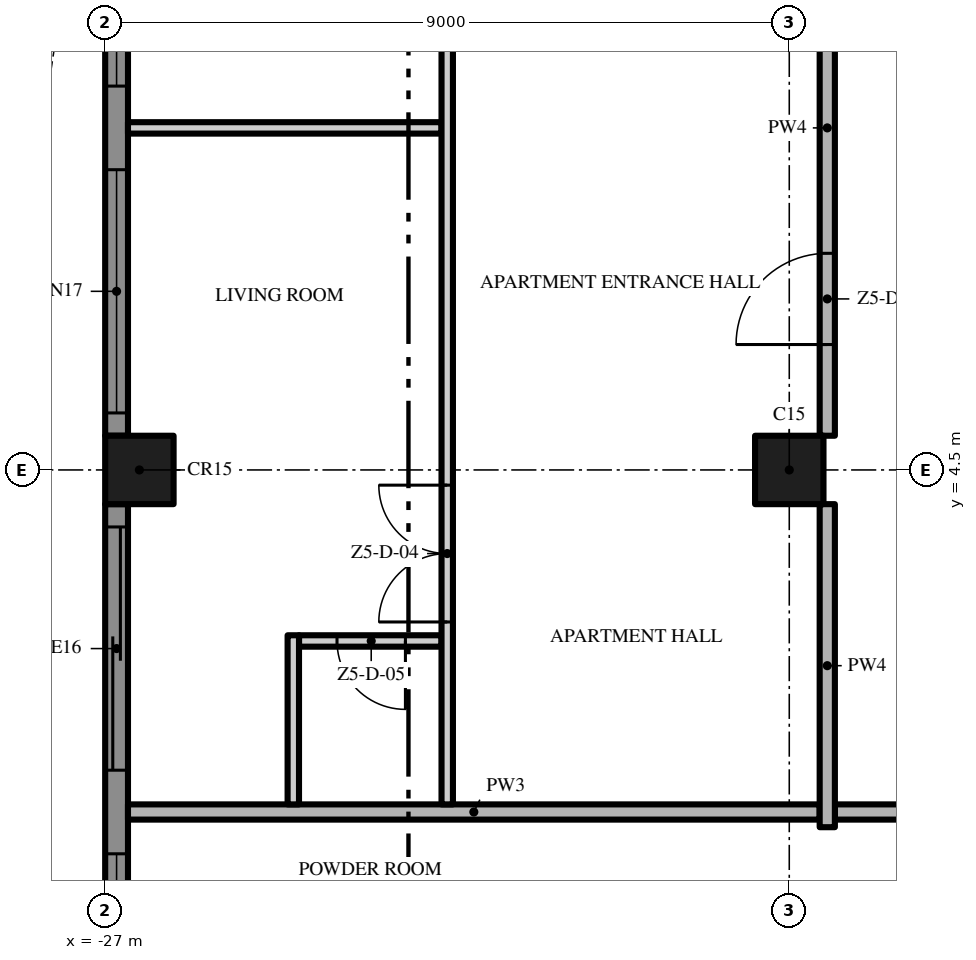
"""IFC4 building model, lengths in metres.
Left out: names, types, materials, properties, quantities, classifications, styles, units other than length and angle.
Written with IfcOpenShell. Run it as: python <this file> out.ifc"""

import sys

from ifc_helpers import new_model, si_unit, direction, frame, frame_2d, origin, origin_2d, place, context, subcontext, project, spatial, polyline, rectangle, outline, extrude, element, fill, save


model = new_model("IFC4")
c1 = context("Model", 3, precision=1e-05, world=origin(), true_north=direction((0.0, 1.0)))
c2 = subcontext(c1, "Body", "Model", "MODEL_VIEW")
j1 = project(units=[si_unit("LENGTHUNIT", "METRE"), si_unit("PLANEANGLEUNIT", "RADIAN")], contexts=[c1])
p1 = place(None, origin())
s1 = spatial("IfcSite", under=j1, at=p1, CompositionType="ELEMENT")
p2 = place(p1, origin())
s2 = spatial("IfcBuilding", under=s1, at=p2, CompositionType="ELEMENT")
p3 = place(p2, frame((0.0, 0.0, 280.6)))
s3 = spatial("IfcBuildingStorey", under=s2, at=p3, CompositionType="ELEMENT", Elevation=280.6)
for number, where, z_axis, x_axis in (
    (1, (-18.0, 4.5, 0.0), (0.0, 0.0, 1.0), (1.0, 0.0, 0.0)),
    (2, (-26.55, 4.5, 0.0), (0.0, 0.0, 1.0), (1.0, 0.0, 0.0)),
):
    element("IfcColumn", number, at=place(p3, frame(where, z_axis=z_axis, x_axis=x_axis)), inside=s3, PredefinedType="COLUMN", context=c2, shape_type="SweptSolid", body=[
        extrude(rectangle(XDim=0.9, YDim=0.9, at=origin_2d()), origin(), (0.0, 0.0, 1.0), 3.5),
    ])
p4 = place(p3, frame((-26.85, 4.95, 0.0), z_axis=(0.0, 0.0, 1.0), x_axis=(0.0, 1.0, 0.0)))
e3 = element("IfcWall", 3, at=p4, inside=s3, PredefinedType="SOLIDWALL", context=c2, shape_type="SweptSolid", body=[
    extrude(rectangle(XDim=8.1, YDim=0.3, at=frame_2d((4.05, 0.0))), origin(), (0.0, 0.0, 1.0), 3.5),
])
p5 = place(p4, frame((4.6, 0.0, 0.45)))
e4 = element("IfcOpeningElement", 4, at=p5, cuts=e3, PredefinedType="OPENING", context=c2, shape_type="SweptSolid", body=[
    extrude(rectangle(XDim=3.2, YDim=2.65, at=frame_2d((1.6, 1.325))), frame((0.0, 0.16, 0.0), z_axis=(0.0, -1.0, 0.0), x_axis=(1.0, 0.0, 0.0)), (0.0, 0.0, 1.0), 0.32),
])
p6 = place(p4, frame((0.3, 0.0, 0.45)))
e5 = element("IfcOpeningElement", 5, at=p6, cuts=e3, PredefinedType="OPENING", context=c2, shape_type="SweptSolid", body=[
    extrude(rectangle(XDim=3.2, YDim=2.65, at=frame_2d((1.6, 1.325))), frame((0.0, 0.16, 0.0), z_axis=(0.0, -1.0, 0.0), x_axis=(1.0, 0.0, 0.0)), (0.0, 0.0, 1.0), 0.32),
])
p7 = place(p3, frame((-26.85, -4.05, 0.0), z_axis=(0.0, 0.0, 1.0), x_axis=(0.0, 1.0, 0.0)))
e6 = element("IfcWall", 6, at=p7, inside=s3, PredefinedType="SOLIDWALL", context=c2, shape_type="SweptSolid", body=[
    extrude(rectangle(XDim=8.1, YDim=0.3, at=frame_2d((4.05, 0.0))), origin(), (0.0, 0.0, 1.0), 3.5),
])
p8 = place(p7, frame((4.6, 0.0, 0.0)))
e7 = element("IfcOpeningElement", 7, at=p8, cuts=e6, PredefinedType="OPENING", context=c2, shape_type="SweptSolid", body=[
    extrude(rectangle(XDim=3.2, YDim=2.4, at=frame_2d((1.6, 1.2))), frame((0.0, 0.16, 0.0), z_axis=(0.0, -1.0, 0.0), x_axis=(1.0, 0.0, 0.0)), (0.0, 0.0, 1.0), 0.32),
])
p9 = place(p7, frame((0.3, 0.0, 0.45)))
e8 = element("IfcOpeningElement", 8, at=p9, cuts=e6, PredefinedType="OPENING", context=c2, shape_type="SweptSolid", body=[
    extrude(rectangle(XDim=3.2, YDim=2.65, at=frame_2d((1.6, 1.325))), frame((0.0, 0.16, 0.0), z_axis=(0.0, -1.0, 0.0), x_axis=(1.0, 0.0, 0.0)), (0.0, 0.0, 1.0), 0.32),
])
p10 = place(p3, origin())
e9 = element("IfcWall", 9, at=p10, inside=s3, PredefinedType="USERDEFINED", context=c2, shape_type="SweptSolid", body=[
    extrude(outline(polyline([(-30.0, 18.0), (-29.771, 16.5), (-29.171, 15.0), (-28.429, 13.5), (-27.829, 12.0), (-27.6, 10.5), (-27.829, 9.0), (-28.429, 7.5), (-29.171, 6.0), (-29.771, 4.5), (-30.0, 3.0), (-29.771, 1.5), (-29.171, 0.0), (-28.429, -1.5), (-27.829, -3.0), (-27.6, -4.5), (-27.829, -6.0), (-28.429, -7.5), (-29.171, -9.0), (-29.771, -10.5), (-30.0, -12.0), (-29.771, -13.5), (-29.171, -15.0), (-28.429, -16.5), (-27.829, -18.0), (-27.597, -17.907), (-28.201, -16.398), (-28.942, -14.898), (-29.528, -13.434), (-29.747, -12.0), (-29.528, -10.566), (-28.942, -9.102), (-28.201, -7.602), (-27.586, -6.066), (-27.347, -4.5), (-27.586, -2.934), (-28.201, -1.398), (-28.942, 0.102), (-29.528, 1.566), (-29.747, 3.0), (-29.528, 4.434), (-28.942, 5.898), (-28.201, 7.398), (-27.586, 8.934), (-27.347, 10.5), (-27.586, 12.066), (-28.201, 13.602), (-28.942, 15.102), (-29.528, 16.566), (-29.753, 18.038), (-30.0, 18.0)])), origin(), (0.0, 0.0, 1.0), 0.9),
])
p11 = place(p3, frame((17.4, 0.0, 0.0), z_axis=(0.0, 0.0, 1.0), x_axis=(-1.0, 0.0, 0.0)))
e10 = element("IfcWall", 10, at=p11, inside=s3, PredefinedType="PARTITIONING", context=c2, shape_type="SweptSolid", body=[
    extrude(rectangle(XDim=34.8, YDim=0.2, at=frame_2d((17.4, 0.0))), origin(), (0.0, 0.0, 1.0), 3.5),
])
p12 = place(p11, frame((25.65, 0.0, 0.0)))
e11 = element("IfcOpeningElement", 11, at=p12, cuts=e10, PredefinedType="OPENING", context=c2, shape_type="SweptSolid", body=[
    extrude(rectangle(XDim=1.5, YDim=2.4, at=frame_2d((0.75, 1.2))), frame((0.0, 0.11, 0.0), z_axis=(0.0, -1.0, 0.0), x_axis=(1.0, 0.0, 0.0)), (0.0, 0.0, 1.0), 0.22),
])
p13 = place(p11, frame((7.65, 0.0, 0.0)))
e12 = element("IfcOpeningElement", 12, at=p13, cuts=e10, PredefinedType="OPENING", context=c2, shape_type="SweptSolid", body=[
    extrude(rectangle(XDim=1.5, YDim=2.4, at=frame_2d((0.75, 1.2))), frame((0.0, 0.11, 0.0), z_axis=(0.0, -1.0, 0.0), x_axis=(1.0, 0.0, 0.0)), (0.0, 0.0, 1.0), 0.22),
])
p14 = place(p3, frame((-26.7, 0.0, 0.0), z_axis=(0.0, 0.0, 1.0), x_axis=(1.0, 0.0, 0.0)))
e13 = element("IfcWall", 13, at=p14, inside=s3, PredefinedType="PARTITIONING", context=c2, shape_type="SweptSolid", body=[
    extrude(rectangle(XDim=9.1, YDim=0.2, at=frame_2d((4.55, 0.0))), origin(), (0.0, 0.0, 1.0), 3.5),
])
p15 = place(p3, frame((-22.575, 2.25, 0.0), z_axis=(0.0, 0.0, 1.0), x_axis=(-1.0, 0.0, 0.0)))
e14 = element("IfcWall", 14, at=p15, inside=s3, PredefinedType="PARTITIONING", context=c2, shape_type="SweptSolid", body=[
    extrude(rectangle(XDim=1.875, YDim=0.15, at=frame_2d((0.938, 0.0))), origin(), (0.0, 0.0, 1.0), 3.5),
])
p16 = place(p15, frame((0.475, 0.0, 0.0)))
e15 = element("IfcOpeningElement", 15, at=p16, cuts=e14, PredefinedType="OPENING", context=c2, shape_type="SweptSolid", body=[
    extrude(rectangle(XDim=0.9, YDim=2.1, at=frame_2d((0.45, 1.05))), frame((0.0, 0.085, 0.0), z_axis=(0.0, -1.0, 0.0), x_axis=(1.0, 0.0, 0.0)), (0.0, 0.0, 1.0), 0.17),
])
p17 = place(p3, frame((-26.7, 9.0, 0.0), z_axis=(0.0, 0.0, 1.0), x_axis=(1.0, 0.0, 0.0)))
e16 = element("IfcWall", 16, at=p17, inside=s3, PredefinedType="PARTITIONING", context=c2, shape_type="SweptSolid", body=[
    extrude(rectangle(XDim=4.125, YDim=0.15, at=frame_2d((2.062, 0.0))), origin(), (0.0, 0.0, 1.0), 3.5),
])
p18 = place(p3, frame((-24.525, 0.1, 0.0), z_axis=(0.0, 0.0, 1.0), x_axis=(0.0, 1.0, 0.0)))
e17 = element("IfcWall", 17, at=p18, inside=s3, PredefinedType="PARTITIONING", context=c2, shape_type="SweptSolid", body=[
    extrude(rectangle(XDim=2.225, YDim=0.15, at=frame_2d((1.113, 0.0))), origin(), (0.0, 0.0, 1.0), 3.5),
])
p19 = place(p3, frame((-22.5, 0.1, 0.0), z_axis=(0.0, 0.0, 1.0), x_axis=(0.0, 1.0, 0.0)))
e18 = element("IfcWall", 18, at=p19, inside=s3, PredefinedType="PARTITIONING", context=c2, shape_type="SweptSolid", body=[
    extrude(rectangle(XDim=17.45, YDim=0.15, at=frame_2d((8.725, 0.0))), origin(), (0.0, 0.0, 1.0), 3.5),
])
p20 = place(p19, frame((2.4, 0.0, 0.0)))
e19 = element("IfcOpeningElement", 19, at=p20, cuts=e18, PredefinedType="OPENING", context=c2, shape_type="SweptSolid", body=[
    extrude(rectangle(XDim=1.8, YDim=2.4, at=frame_2d((0.9, 1.2))), frame((0.0, 0.085, 0.0), z_axis=(0.0, -1.0, 0.0), x_axis=(1.0, 0.0, 0.0)), (0.0, 0.0, 1.0), 0.17),
])
p21 = place(p19, frame((10.65, 0.0, 0.0)))
e20 = element("IfcOpeningElement", 20, at=p21, cuts=e18, PredefinedType="OPENING", context=c2, shape_type="SweptSolid", body=[
    extrude(rectangle(XDim=1.0, YDim=2.4, at=frame_2d((0.5, 1.2))), frame((0.0, 0.085, 0.0), z_axis=(0.0, -1.0, 0.0), x_axis=(1.0, 0.0, 0.0)), (0.0, 0.0, 1.0), 0.17),
])
p22 = place(p3, frame((-17.5, -0.2, 0.0), z_axis=(0.0, 0.0, 1.0), x_axis=(0.0, 1.0, 0.0)))
e21 = element("IfcWall", 21, at=p22, inside=s3, PredefinedType="PARTITIONING", context=c2, shape_type="SweptSolid", body=[
    extrude(rectangle(XDim=4.25, YDim=0.2, at=frame_2d((2.125, 0.0))), origin(), (0.0, 0.0, 1.0), 3.5),
])
p23 = place(p3, frame((-17.5, 4.95, 0.0), z_axis=(0.0, 0.0, 1.0), x_axis=(0.0, 1.0, 0.0)))
e22 = element("IfcWall", 22, at=p23, inside=s3, PredefinedType="PARTITIONING", context=c2, shape_type="SweptSolid", body=[
    extrude(rectangle(XDim=8.1, YDim=0.2, at=frame_2d((4.05, 0.0))), origin(), (0.0, 0.0, 1.0), 3.5),
])
p24 = place(p23, frame((1.2, 0.0, 0.0)))
e23 = element("IfcOpeningElement", 23, at=p24, cuts=e22, PredefinedType="OPENING", context=c2, shape_type="SweptSolid", body=[
    extrude(rectangle(XDim=1.2, YDim=2.4, at=frame_2d((0.6, 1.2))), frame((0.0, 0.11, 0.0), z_axis=(0.0, -1.0, 0.0), x_axis=(1.0, 0.0, 0.0)), (0.0, 0.0, 1.0), 0.22),
])
p25 = place(p5, origin())
e24 = element("IfcWindow", 24, at=p25, inside=s3, PartitioningType="SINGLE_PANEL", PredefinedType="WINDOW", context=c2, shape_type="SweptSolid", body=[
    extrude(rectangle(XDim=3.2, YDim=2.65, at=frame_2d((1.6, 1.325))), frame((0.0, 0.03, 0.0), z_axis=(0.0, -1.0, 0.0), x_axis=(1.0, 0.0, 0.0)), (0.0, 0.0, 1.0), 0.06),
])
fill(e4, e24)
p26 = place(p6, origin())
e25 = element("IfcWindow", 25, at=p26, inside=s3, PartitioningType="SINGLE_PANEL", PredefinedType="WINDOW", context=c2, shape_type="SweptSolid", body=[
    extrude(rectangle(XDim=3.2, YDim=2.65, at=frame_2d((1.6, 1.325))), frame((0.0, 0.03, 0.0), z_axis=(0.0, -1.0, 0.0), x_axis=(1.0, 0.0, 0.0)), (0.0, 0.0, 1.0), 0.06),
])
fill(e5, e25)
p27 = place(p8, origin())
e26 = element("IfcDoor", 26, at=p27, inside=s3, OperationType="SINGLE_SWING_LEFT", PredefinedType="DOOR", context=c2, shape_type="SweptSolid", body=[
    extrude(rectangle(XDim=3.2, YDim=2.4, at=frame_2d((1.6, 1.2))), frame((0.0, 0.025, 0.0), z_axis=(0.0, -1.0, 0.0), x_axis=(1.0, 0.0, 0.0)), (0.0, 0.0, 1.0), 0.05),
])
fill(e7, e26)
p28 = place(p9, origin())
e27 = element("IfcWindow", 27, at=p28, inside=s3, PartitioningType="SINGLE_PANEL", PredefinedType="WINDOW", context=c2, shape_type="SweptSolid", body=[
    extrude(rectangle(XDim=3.2, YDim=2.65, at=frame_2d((1.6, 1.325))), frame((0.0, 0.03, 0.0), z_axis=(0.0, -1.0, 0.0), x_axis=(1.0, 0.0, 0.0)), (0.0, 0.0, 1.0), 0.06),
])
fill(e8, e27)
p29 = place(p24, origin())
e28 = element("IfcDoor", 28, at=p29, inside=s3, OperationType="SINGLE_SWING_LEFT", PredefinedType="DOOR", context=c2, shape_type="SweptSolid", body=[
    extrude(rectangle(XDim=1.2, YDim=2.4, at=frame_2d((0.6, 1.2))), frame((0.0, 0.025, 0.0), z_axis=(0.0, -1.0, 0.0), x_axis=(1.0, 0.0, 0.0)), (0.0, 0.0, 1.0), 0.05),
])
fill(e23, e28)
p30 = place(p20, origin())
e29 = element("IfcDoor", 29, at=p30, inside=s3, OperationType="DOUBLE_DOOR_SINGLE_SWING", PredefinedType="DOOR", context=c2, shape_type="SweptSolid", body=[
    extrude(rectangle(XDim=1.8, YDim=2.4, at=frame_2d((0.9, 1.2))), frame((0.0, 0.025, 0.0), z_axis=(0.0, -1.0, 0.0), x_axis=(1.0, 0.0, 0.0)), (0.0, 0.0, 1.0), 0.05),
])
fill(e19, e29)
p31 = place(p16, origin())
e30 = element("IfcDoor", 30, at=p31, inside=s3, OperationType="SINGLE_SWING_LEFT", PredefinedType="DOOR", context=c2, shape_type="SweptSolid", body=[
    extrude(rectangle(XDim=0.9, YDim=2.1, at=frame_2d((0.45, 1.05))), frame((0.0, 0.025, 0.0), z_axis=(0.0, -1.0, 0.0), x_axis=(1.0, 0.0, 0.0)), (0.0, 0.0, 1.0), 0.05),
])
fill(e15, e30)
save(model, sys.argv[1])
